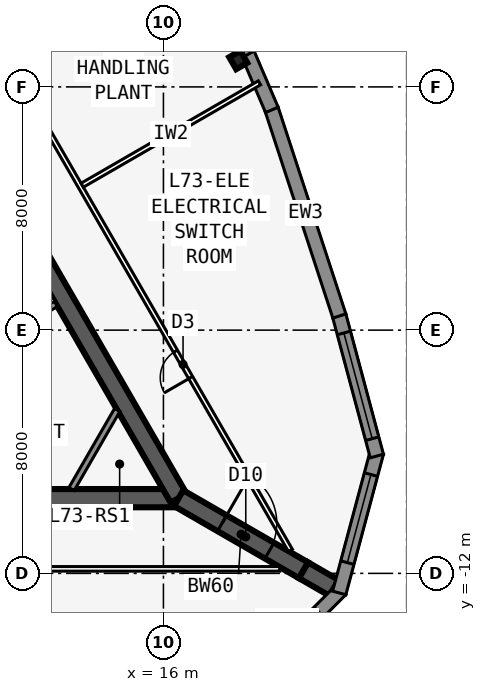
"""IFC4 building model, lengths in metres.
Left out: names, types, materials, properties, quantities, classifications, styles, units other than length and angle.
Written with IfcOpenShell. Run it as: python <this file> out.ifc"""

import sys

from ifc_helpers import new_model, si_unit, direction, frame, frame_2d, origin, origin_2d, place, context, subcontext, project, spatial, polyline, rectangle, i_section, outline, extrude, element, fill, save


model = new_model("IFC4")
c1 = context("Model", 3, precision=1e-05, world=origin(), true_north=direction((0.0, 1.0)))
c2 = subcontext(c1, "Body", "Model", "MODEL_VIEW")
j1 = project(units=[si_unit("LENGTHUNIT", "METRE"), si_unit("PLANEANGLEUNIT", "RADIAN")], contexts=[c1])
p1 = place(None, origin())
s1 = spatial("IfcSite", under=j1, at=p1, CompositionType="ELEMENT")
p2 = place(p1, origin())
s2 = spatial("IfcBuilding", under=s1, at=p2, CompositionType="ELEMENT")
p3 = place(p2, frame((0.0, 0.0, 275.3)))
s3 = spatial("IfcBuildingStorey", under=s2, at=p3, CompositionType="ELEMENT", Elevation=275.3)
p4 = place(p3, frame((0.0, -9.526, 0.0), z_axis=(0.0, 0.0, 1.0), x_axis=(1.0, 0.0, 0.0)))
e1 = element("IfcWall", 1, at=p4, inside=s3, PredefinedType="SHEAR", context=c2, shape_type="SweptSolid", body=[
    extrude(rectangle(XDim=16.5, YDim=0.6, at=frame_2d((8.25, 0.0))), origin(), (0.0, 0.0, 1.0), 6.0),
])
p5 = place(p3, frame((16.5, -9.526, 0.0), z_axis=(0.0, 0.0, 1.0), x_axis=(-0.499996545922, 0.866027397988, 0.0)))
e2 = element("IfcWall", 2, at=p5, inside=s3, PredefinedType="SHEAR", context=c2, shape_type="SweptSolid", body=[
    extrude(rectangle(XDim=16.5, YDim=0.6, at=frame_2d((8.25, 0.0))), origin(), (0.0, 0.0, 1.0), 6.0),
])
p6 = place(p5, frame((14.15, 0.0, 0.0)))
e3 = element("IfcOpeningElement", 3, at=p6, cuts=e2, PredefinedType="OPENING", context=c2, shape_type="SweptSolid", body=[
    extrude(rectangle(XDim=1.8, YDim=2.13, at=frame_2d((0.9, 1.065))), frame((0.0, 0.31, 0.0), z_axis=(0.0, -1.0, 0.0), x_axis=(1.0, 0.0, 0.0)), (0.0, 0.0, 1.0), 0.62),
])
p7 = place(p5, frame((12.6, 0.0, 0.0)))
e4 = element("IfcOpeningElement", 4, at=p7, cuts=e2, PredefinedType="OPENING", context=c2, shape_type="SweptSolid", body=[
    extrude(rectangle(XDim=1.0, YDim=2.13, at=frame_2d((0.5, 1.065))), frame((0.0, 0.31, 0.0), z_axis=(0.0, -1.0, 0.0), x_axis=(1.0, 0.0, 0.0)), (0.0, 0.0, 1.0), 0.62),
])
p8 = place(p3, frame((9.629, -4.775, 0.0), z_axis=(0.0, 0.0, 1.0), x_axis=(0.865995643347, 0.500051543047, 0.0)))
e5 = element("IfcWall", 5, at=p8, inside=s3, PredefinedType="SOLIDWALL", context=c2, shape_type="SweptSolid", body=[
    extrude(rectangle(XDim=3.275, YDim=0.2, at=frame_2d((1.638, 0.0))), origin(), (0.0, 0.0, 1.0), 5.75),
])
p9 = place(p3, frame((16.5, -9.526, 0.0), z_axis=(0.0, 0.0, 1.0), x_axis=(0.866031398331, -0.499989616998, 0.0)))
e6 = element("IfcWall", 6, at=p9, inside=s3, PredefinedType="SHEAR", context=c2, shape_type="SweptSolid", body=[
    extrude(rectangle(XDim=4.746, YDim=0.6, at=frame_2d((2.373, 0.0))), origin(), (0.0, 0.0, 1.0), 6.0),
])
p10 = place(p9, frame((1.65, 0.0, 0.0)))
e7 = element("IfcOpeningElement", 7, at=p10, cuts=e6, PredefinedType="OPENING", context=c2, shape_type="SweptSolid", body=[
    extrude(rectangle(XDim=1.8, YDim=2.13, at=frame_2d((0.9, 1.065))), frame((0.0, 0.31, 0.0), z_axis=(0.0, -1.0, 0.0), x_axis=(1.0, 0.0, 0.0)), (0.0, 0.0, 1.0), 0.62),
])
p11 = place(p3, frame((20.61, -11.899, 0.0), z_axis=(0.0, 0.0, 1.0), x_axis=(0.866009537788, -0.500027479704, 0.0)))
e8 = element("IfcWall", 8, at=p11, inside=s3, PredefinedType="SHEAR", context=c2, shape_type="SweptSolid", body=[
    extrude(rectangle(XDim=1.155, YDim=0.6, at=frame_2d((0.577, 0.0))), origin(), (0.0, 0.0, 1.0), 6.0),
])
p12 = place(p3, frame((8.25, 4.763, 0.0), z_axis=(0.0, 0.0, 1.0), x_axis=(0.866023543838, 0.500003221507, 0.0)))
e9 = element("IfcWall", 9, at=p12, inside=s3, PredefinedType="SHEAR", context=c2, shape_type="SweptSolid", body=[
    extrude(rectangle(XDim=8.154, YDim=0.9, at=frame_2d((4.077, 0.0))), origin(), (0.0, 0.0, 1.0), 6.0),
])
p13 = place(p3, frame((18.461, 4.885, 0.0), z_axis=(0.0, 0.0, 1.0), x_axis=(0.866025403784, 0.5, 0.0)))
e10 = element("IfcColumn", 10, at=p13, inside=s3, PredefinedType="COLUMN", context=c2, shape_type="SweptSolid", body=[
    extrude(i_section(OverallWidth=0.419, OverallDepth=0.455, WebThickness=0.042, FlangeThickness=0.068, at=origin_2d()), origin(), (0.0, 0.0, 1.0), 6.0),
])
p14 = place(p3, frame((18.46, -15.924, 0.0), z_axis=(0.0, 0.0, 1.0), x_axis=(0.707081252484, 0.707132308968, 0.0)))
e11 = element("IfcWall", 11, at=p14, inside=s3, PredefinedType="SOLIDWALL", context=c2, shape_type="SweptSolid", body=[
    extrude(outline(polyline([(4.782, 0.225), (4.723, 0.225), (4.375, 0.132), (4.351, 0.225), (0.0, 0.225), (0.0, -0.225), (4.782, -0.225), (4.782, 0.225)])), origin(), (0.0, 0.0, 1.0), 5.75),
])
p15 = place(p14, frame((0.75, 0.0, 0.9)))
e12 = element("IfcOpeningElement", 12, at=p15, cuts=e11, PredefinedType="OPENING", context=c2, shape_type="SweptSolid", body=[
    extrude(rectangle(XDim=3.0, YDim=3.6, at=frame_2d((1.5, 1.8))), frame((0.0, 0.235, 0.0), z_axis=(0.0, -1.0, 0.0), x_axis=(1.0, 0.0, 0.0)), (0.0, 0.0, 1.0), 0.47),
])
p16 = place(p3, frame((21.783, -12.644, 0.0), z_axis=(0.0, 0.0, 1.0), x_axis=(0.25880328844, 0.965930048136, 0.0)))
e13 = element("IfcWall", 13, at=p16, inside=s3, PredefinedType="SOLIDWALL", context=c2, shape_type="SweptSolid", body=[
    extrude(outline(polyline([(4.782, 0.225), (0.431, 0.225), (0.406, 0.132), (0.06, 0.225), (0.0, 0.225), (0.0, -0.225), (4.782, -0.225), (4.782, 0.225)])), origin(), (0.0, 0.0, 1.0), 5.75),
])
p17 = place(p16, frame((1.031, 0.0, 0.9)))
e14 = element("IfcOpeningElement", 14, at=p17, cuts=e13, PredefinedType="OPENING", context=c2, shape_type="SweptSolid", body=[
    extrude(rectangle(XDim=3.0, YDim=3.6, at=frame_2d((1.5, 1.8))), frame((0.0, 0.235, 0.0), z_axis=(0.0, -1.0, 0.0), x_axis=(1.0, 0.0, 0.0)), (0.0, 0.0, 1.0), 0.47),
])
p18 = place(p3, frame((23.02, -8.141, 0.0), z_axis=(0.0, 0.0, 1.0), x_axis=(-0.25880328844, 0.965930048136, 0.0)))
e15 = element("IfcWall", 15, at=p18, inside=s3, PredefinedType="SOLIDWALL", context=c2, shape_type="SweptSolid", body=[
    extrude(rectangle(XDim=4.782, YDim=0.45, at=frame_2d((2.391, 0.0))), origin(), (0.0, 0.0, 1.0), 5.75),
])
p19 = place(p18, frame((0.591, 0.0, 0.9)))
e16 = element("IfcOpeningElement", 16, at=p19, cuts=e15, PredefinedType="OPENING", context=c2, shape_type="SweptSolid", body=[
    extrude(rectangle(XDim=3.6, YDim=3.6, at=frame_2d((1.8, 1.8))), frame((0.0, 0.235, 0.0), z_axis=(0.0, -1.0, 0.0), x_axis=(1.0, 0.0, 0.0)), (0.0, 0.0, 1.0), 0.47),
])
p20 = place(p3, frame((21.786, -3.534, 0.0), z_axis=(0.0, 0.0, 1.0), x_axis=(-0.311328857048, 0.95030223759, 0.0)))
e17 = element("IfcWall", 17, at=p20, inside=s3, PredefinedType="SOLIDWALL", context=c2, shape_type="SweptSolid", body=[
    extrude(outline(polyline([(0.0, 0.0), (7.153, 0.0), (7.153, 5.75), (0.0, 5.75), (0.0, 0.0)]), holes=[polyline([(5.826, 2.875), (5.75, 3.457), (5.525, 4.0), (5.167, 4.466), (4.701, 4.823), (4.159, 5.048), (3.576, 5.125), (2.994, 5.048), (2.451, 4.823), (1.985, 4.466), (1.628, 4.0), (1.403, 3.457), (1.326, 2.875), (1.403, 2.293), (1.628, 1.75), (1.985, 1.284), (2.451, 0.926), (2.994, 0.702), (3.576, 0.625), (4.159, 0.702), (4.701, 0.926), (5.167, 1.284), (5.525, 1.75), (5.75, 2.293), (5.826, 2.875)])]), frame((0.0, 0.225, 0.0), z_axis=(0.0, -1.0, 0.0), x_axis=(1.0, 0.0, 0.0)), (0.0, 0.0, 1.0), 0.45),
])
p21 = place(p3, frame((19.566, 3.245, 0.0), z_axis=(0.0, 0.0, 1.0), x_axis=(-0.393290226175, 0.91941437774, 0.0)))
e18 = element("IfcWall", 18, at=p21, inside=s3, PredefinedType="SOLIDWALL", context=c2, shape_type="SweptSolid", body=[
    extrude(rectangle(XDim=2.014, YDim=0.45, at=frame_2d((1.007, 0.0))), origin(), (0.0, 0.0, 1.0), 5.75),
])
p22 = place(p3, frame((18.786, 5.073, 0.0), z_axis=(0.0, 0.0, 1.0), x_axis=(-0.499993662806, 0.866029062534, 0.0)))
e19 = element("IfcWall", 19, at=p22, inside=s3, PredefinedType="SOLIDWALL", context=c2, shape_type="SweptSolid", body=[
    extrude(outline(polyline([(0.0, 0.0), (10.0, 0.0), (10.0, 5.75), (0.0, 5.75), (0.0, 0.0)]), holes=[polyline([(7.25, 2.875), (7.173, 3.457), (6.948, 4.0), (6.591, 4.466), (6.125, 4.823), (5.583, 5.048), (5.0, 5.125), (4.418, 5.048), (3.875, 4.823), (3.409, 4.466), (3.052, 4.0), (2.827, 3.457), (2.75, 2.875), (2.827, 2.293), (3.052, 1.75), (3.409, 1.284), (3.875, 0.926), (4.418, 0.702), (5.0, 0.625), (5.583, 0.702), (6.125, 0.926), (6.591, 1.284), (6.948, 1.75), (7.173, 2.293), (7.25, 2.875)])]), frame((0.0, 0.225, 0.0), z_axis=(0.0, -1.0, 0.0), x_axis=(1.0, 0.0, 0.0)), (0.0, 0.0, 1.0), 0.45),
])
p23 = place(p3, frame((-19.827, -11.851, 0.0), z_axis=(0.0, 0.0, 1.0), x_axis=(1.0, 0.0, 0.0)))
e20 = element("IfcWall", 20, at=p23, inside=s3, PredefinedType="PARTITIONING", context=c2, shape_type="SweptSolid", body=[
    extrude(rectangle(XDim=39.654, YDim=0.15, at=frame_2d((19.827, 0.0))), origin(), (0.0, 0.0, 1.0), 5.75),
])
p24 = place(p23, frame((7.063, 0.0, 0.0)))
e21 = element("IfcOpeningElement", 21, at=p24, cuts=e20, PredefinedType="OPENING", context=c2, shape_type="SweptSolid", body=[
    extrude(rectangle(XDim=1.0, YDim=2.13, at=frame_2d((0.5, 1.065))), frame((0.0, 0.085, 0.0), z_axis=(0.0, -1.0, 0.0), x_axis=(1.0, 0.0, 0.0)), (0.0, 0.0, 1.0), 0.17),
])
p25 = place(p23, frame((16.827, 0.0, 0.0)))
e22 = element("IfcOpeningElement", 22, at=p25, cuts=e20, PredefinedType="OPENING", context=c2, shape_type="SweptSolid", body=[
    extrude(rectangle(XDim=1.0, YDim=2.13, at=frame_2d((0.5, 1.065))), frame((0.0, 0.085, 0.0), z_axis=(0.0, -1.0, 0.0), x_axis=(1.0, 0.0, 0.0)), (0.0, 0.0, 1.0), 0.17),
])
p26 = place(p23, frame((29.091, 0.0, 0.0)))
e23 = element("IfcOpeningElement", 23, at=p26, cuts=e20, PredefinedType="OPENING", context=c2, shape_type="SweptSolid", body=[
    extrude(rectangle(XDim=1.0, YDim=2.13, at=frame_2d((0.5, 1.065))), frame((0.0, 0.085, 0.0), z_axis=(0.0, -1.0, 0.0), x_axis=(1.0, 0.0, 0.0)), (0.0, 0.0, 1.0), 0.17),
])
p27 = place(p3, frame((20.177, -11.245, 0.0), z_axis=(0.0, 0.0, 1.0), x_axis=(-0.499998875317, 0.866026053119, 0.0)))
e24 = element("IfcWall", 24, at=p27, inside=s3, PredefinedType="PARTITIONING", context=c2, shape_type="SweptSolid", body=[
    extrude(rectangle(XDim=39.654, YDim=0.15, at=frame_2d((19.827, 0.0))), origin(), (0.0, 0.0, 1.0), 5.75),
])
p28 = place(p27, frame((6.563, 0.0, 0.0)))
e25 = element("IfcOpeningElement", 25, at=p28, cuts=e24, PredefinedType="OPENING", context=c2, shape_type="SweptSolid", body=[
    extrude(rectangle(XDim=1.0, YDim=2.13, at=frame_2d((0.5, 1.065))), frame((0.0, 0.085, 0.0), z_axis=(0.0, -1.0, 0.0), x_axis=(1.0, 0.0, 0.0)), (0.0, 0.0, 1.0), 0.17),
])
p29 = place(p27, frame((16.327, 0.0, 0.0)))
e26 = element("IfcOpeningElement", 26, at=p29, cuts=e24, PredefinedType="OPENING", context=c2, shape_type="SweptSolid", body=[
    extrude(rectangle(XDim=1.0, YDim=2.13, at=frame_2d((0.5, 1.065))), frame((0.0, 0.085, 0.0), z_axis=(0.0, -1.0, 0.0), x_axis=(1.0, 0.0, 0.0)), (0.0, 0.0, 1.0), 0.17),
])
p30 = place(p27, frame((29.091, 0.0, 0.0)))
e27 = element("IfcOpeningElement", 27, at=p30, cuts=e24, PredefinedType="OPENING", context=c2, shape_type="SweptSolid", body=[
    extrude(rectangle(XDim=1.0, YDim=2.13, at=frame_2d((0.5, 1.065))), frame((0.0, 0.085, 0.0), z_axis=(0.0, -1.0, 0.0), x_axis=(1.0, 0.0, 0.0)), (0.0, 0.0, 1.0), 0.17),
])
p31 = place(p3, frame((13.329, 0.767, 0.0), z_axis=(0.0, 0.0, 1.0), x_axis=(0.866020720842, 0.500008111007, 0.0)))
e28 = element("IfcWall", 28, at=p31, inside=s3, PredefinedType="PARTITIONING", context=c2, shape_type="SweptSolid", body=[
    extrude(rectangle(XDim=6.732, YDim=0.15, at=frame_2d((3.366, 0.0))), origin(), (0.0, 0.0, 1.0), 5.75),
])
p32 = place(p3, frame((14.479, -6.626, 0.0), z_axis=(0.0, 0.0, 1.0), x_axis=(-0.499952404951, -0.866052881055, 0.0)))
e29 = element("IfcWall", 29, at=p32, inside=s3, PredefinedType="SOLIDWALL", context=c2, shape_type="SweptSolid", body=[
    extrude(rectangle(XDim=3.002, YDim=0.2, at=frame_2d((1.501, 0.0))), origin(), (0.0, 0.0, 1.0), 5.75),
])
p33 = place(p15, origin())
e30 = element("IfcWindow", 30, at=p33, inside=s3, PartitioningType="SINGLE_PANEL", PredefinedType="WINDOW", context=c2, shape_type="SweptSolid", body=[
    extrude(rectangle(XDim=3.0, YDim=3.6, at=frame_2d((1.5, 1.8))), frame((0.0, 0.03, 0.0), z_axis=(0.0, -1.0, 0.0), x_axis=(1.0, 0.0, 0.0)), (0.0, 0.0, 1.0), 0.06),
])
fill(e12, e30)
p34 = place(p17, origin())
e31 = element("IfcWindow", 31, at=p34, inside=s3, PartitioningType="SINGLE_PANEL", PredefinedType="WINDOW", context=c2, shape_type="SweptSolid", body=[
    extrude(rectangle(XDim=3.0, YDim=3.6, at=frame_2d((1.5, 1.8))), frame((0.0, 0.03, 0.0), z_axis=(0.0, -1.0, 0.0), x_axis=(1.0, 0.0, 0.0)), (0.0, 0.0, 1.0), 0.06),
])
fill(e14, e31)
p35 = place(p19, origin())
e32 = element("IfcWindow", 32, at=p35, inside=s3, PartitioningType="SINGLE_PANEL", PredefinedType="WINDOW", context=c2, shape_type="SweptSolid", body=[
    extrude(rectangle(XDim=3.6, YDim=3.6, at=frame_2d((1.8, 1.8))), frame((0.0, 0.03, 0.0), z_axis=(0.0, -1.0, 0.0), x_axis=(1.0, 0.0, 0.0)), (0.0, 0.0, 1.0), 0.06),
])
fill(e16, e32)
p36 = place(p28, origin())
e33 = element("IfcDoor", 33, at=p36, inside=s3, OperationType="SINGLE_SWING_LEFT", PredefinedType="DOOR", context=c2, shape_type="SweptSolid", body=[
    extrude(rectangle(XDim=1.0, YDim=2.13, at=frame_2d((0.5, 1.065))), frame((0.0, 0.025, 0.0), z_axis=(0.0, -1.0, 0.0), x_axis=(1.0, 0.0, 0.0)), (0.0, 0.0, 1.0), 0.05),
])
fill(e25, e33)
p37 = place(p10, origin())
e34 = element("IfcDoor", 34, at=p37, inside=s3, OperationType="DOUBLE_DOOR_DOUBLE_SWING", PredefinedType="DOOR", context=c2, shape_type="SweptSolid", body=[
    extrude(rectangle(XDim=1.8, YDim=2.13, at=frame_2d((0.9, 1.065))), frame((0.0, 0.025, 0.0), z_axis=(0.0, -1.0, 0.0), x_axis=(1.0, 0.0, 0.0)), (0.0, 0.0, 1.0), 0.05),
])
fill(e7, e34)
save(model, sys.argv[1])
